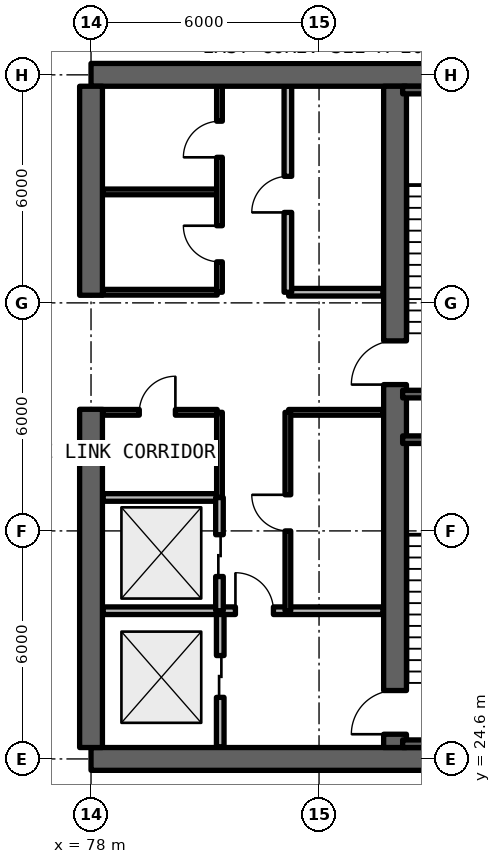
"""IFC4 building model, lengths in metres.
Left out: names, types, materials, properties, quantities, classifications, styles, units other than length and angle.
Written with IfcOpenShell. Run it as: python <this file> out.ifc"""

import sys

from ifc_helpers import new_model, si_unit, direction, frame, frame_2d, origin, place, context, subcontext, project, spatial, rectangle, extrude, element, fill, save


model = new_model("IFC4")
c1 = context("Model", 3, precision=1e-05, world=origin(), true_north=direction((0.0, 1.0)))
c2 = subcontext(c1, "Body", "Model", "MODEL_VIEW")
j1 = project(units=[si_unit("LENGTHUNIT", "METRE"), si_unit("PLANEANGLEUNIT", "RADIAN")], contexts=[c1])
p1 = place(None, origin())
s1 = spatial("IfcSite", under=j1, at=p1, CompositionType="ELEMENT")
p2 = place(p1, origin())
s2 = spatial("IfcBuilding", under=s1, at=p2, CompositionType="ELEMENT")
p3 = place(p2, frame((0.0, 0.0, -9.24)))
s3 = spatial("IfcBuildingStorey", under=s2, at=p3, CompositionType="ELEMENT", Elevation=-9.24)
for number, where, z_axis, x_axis in (
    (1, (78.0, 24.6, 0.0), (0.0, 0.0, 1.0), (1.0, 0.0, 0.0)),
    (2, (90.0, 42.6, 0.0), (0.0, 0.0, 1.0), (-1.0, 0.0, 0.0)),
):
    element("IfcWall", number, at=place(p3, frame(where, z_axis=z_axis, x_axis=x_axis)), inside=s3, PredefinedType="SHEAR", context=c2, shape_type="SweptSolid", body=[
        extrude(rectangle(XDim=12.0, YDim=0.6, at=frame_2d((6.0, 0.0))), origin(), (0.0, 0.0, 1.0), 4.62),
    ])
p4 = place(p3, frame((78.0, 24.9, 0.0), z_axis=(0.0, 0.0, 1.0), x_axis=(0.0, 1.0, 0.0)))
e3 = element("IfcWall", 3, at=p4, inside=s3, PredefinedType="SHEAR", context=c2, shape_type="SweptSolid", body=[
    extrude(rectangle(XDim=8.9, YDim=0.6, at=frame_2d((4.45, 0.0))), origin(), (0.0, 0.0, 1.0), 4.62),
])
p5 = place(p3, frame((78.0, 36.8, 0.0), z_axis=(0.0, 0.0, 1.0), x_axis=(0.0, 1.0, 0.0)))
e4 = element("IfcWall", 4, at=p5, inside=s3, PredefinedType="SHEAR", context=c2, shape_type="SweptSolid", body=[
    extrude(rectangle(XDim=5.5, YDim=0.6, at=frame_2d((2.75, 0.0))), origin(), (0.0, 0.0, 1.0), 4.62),
])
p6 = place(p3, frame((86.0, 24.9, 0.0), z_axis=(0.0, 0.0, 1.0), x_axis=(0.0, 1.0, 0.0)))
e5 = element("IfcWall", 5, at=p6, inside=s3, PredefinedType="SHEAR", context=c2, shape_type="SweptSolid", body=[
    extrude(rectangle(XDim=17.4, YDim=0.6, at=frame_2d((8.7, 0.0))), origin(), (0.0, 0.0, 1.0), 4.62),
])
p7 = place(p6, frame((0.35, 0.0, 0.0)))
e6 = element("IfcOpeningElement", 6, at=p7, cuts=e5, PredefinedType="OPENING", context=c2, shape_type="SweptSolid", body=[
    extrude(rectangle(XDim=1.15, YDim=2.15, at=frame_2d((0.575, 1.075))), frame((0.0, 0.31, 0.0), z_axis=(0.0, -1.0, 0.0), x_axis=(1.0, 0.0, 0.0)), (0.0, 0.0, 1.0), 0.62),
])
p8 = place(p6, frame((9.55, 0.0, 0.0)))
e7 = element("IfcOpeningElement", 7, at=p8, cuts=e5, PredefinedType="OPENING", context=c2, shape_type="SweptSolid", body=[
    extrude(rectangle(XDim=1.15, YDim=2.15, at=frame_2d((0.575, 1.075))), frame((0.0, 0.31, 0.0), z_axis=(0.0, -1.0, 0.0), x_axis=(1.0, 0.0, 0.0)), (0.0, 0.0, 1.0), 0.62),
])
p9 = place(p3, frame((81.4, 24.92, 0.0), z_axis=(0.0, 0.0, 1.0), x_axis=(0.0, 1.0, 0.0)))
e8 = element("IfcWall", 8, at=p9, inside=s3, PredefinedType="SOLIDWALL", context=c2, shape_type="SweptSolid", body=[
    extrude(rectangle(XDim=3.58, YDim=0.2, at=frame_2d((1.79, 0.0))), origin(), (0.0, 0.0, 1.0), 3.54),
])
p10 = place(p9, frame((1.3, 0.0, 0.0)))
e9 = element("IfcOpeningElement", 9, at=p10, cuts=e8, PredefinedType="OPENING", context=c2, shape_type="SweptSolid", body=[
    extrude(rectangle(XDim=1.1, YDim=2.2, at=frame_2d((0.55, 1.1))), frame((0.0, 0.11, 0.0), z_axis=(0.0, -1.0, 0.0), x_axis=(1.0, 0.0, 0.0)), (0.0, 0.0, 1.0), 0.22),
])
p11 = place(p3, frame((78.32, 28.5, 0.0), z_axis=(0.0, 0.0, 1.0), x_axis=(1.0, 0.0, 0.0)))
e10 = element("IfcWall", 10, at=p11, inside=s3, PredefinedType="SOLIDWALL", context=c2, shape_type="SweptSolid", body=[
    extrude(rectangle(XDim=7.36, YDim=0.2, at=frame_2d((3.68, 0.0))), origin(), (0.0, 0.0, 1.0), 3.54),
])
p12 = place(p11, frame((3.48, 0.0, 0.0)))
e11 = element("IfcOpeningElement", 11, at=p12, cuts=e10, PredefinedType="OPENING", context=c2, shape_type="SweptSolid", body=[
    extrude(rectangle(XDim=1.0, YDim=2.15, at=frame_2d((0.5, 1.075))), frame((0.0, 0.11, 0.0), z_axis=(0.0, -1.0, 0.0), x_axis=(1.0, 0.0, 0.0)), (0.0, 0.0, 1.0), 0.22),
])
p13 = place(p3, frame((83.2, 33.72, 0.0), z_axis=(0.0, 0.0, 1.0), x_axis=(1.0, 0.0, 0.0)))
e12 = element("IfcWall", 12, at=p13, inside=s3, PredefinedType="SOLIDWALL", context=c2, shape_type="SweptSolid", body=[
    extrude(rectangle(XDim=2.48, YDim=0.15, at=frame_2d((1.24, 0.0))), origin(), (0.0, 0.0, 1.0), 3.54),
])
p14 = place(p3, frame((83.18, 28.5, 0.0), z_axis=(0.0, 0.0, 1.0), x_axis=(0.0, 1.0, 0.0)))
e13 = element("IfcWall", 13, at=p14, inside=s3, PredefinedType="SOLIDWALL", context=c2, shape_type="SweptSolid", body=[
    extrude(rectangle(XDim=5.22, YDim=0.15, at=frame_2d((2.61, 0.0))), origin(), (0.0, 0.0, 1.0), 3.54),
])
p15 = place(p14, frame((2.1, 0.0, 0.0)))
e14 = element("IfcOpeningElement", 14, at=p15, cuts=e13, PredefinedType="OPENING", context=c2, shape_type="SweptSolid", body=[
    extrude(rectangle(XDim=0.95, YDim=2.15, at=frame_2d((0.475, 1.075))), frame((0.0, 0.085, 0.0), z_axis=(0.0, -1.0, 0.0), x_axis=(1.0, 0.0, 0.0)), (0.0, 0.0, 1.0), 0.17),
])
p16 = place(p3, frame((78.32, 31.48, 0.0), z_axis=(0.0, 0.0, 1.0), x_axis=(1.0, 0.0, 0.0)))
e15 = element("IfcWall", 15, at=p16, inside=s3, PredefinedType="SOLIDWALL", context=c2, shape_type="SweptSolid", body=[
    extrude(rectangle(XDim=3.0, YDim=0.2, at=frame_2d((1.5, 0.0))), origin(), (0.0, 0.0, 1.0), 3.54),
])
p17 = place(p3, frame((81.38, 28.5, 0.0), z_axis=(0.0, 0.0, 1.0), x_axis=(0.0, 1.0, 0.0)))
e16 = element("IfcWall", 16, at=p17, inside=s3, PredefinedType="SOLIDWALL", context=c2, shape_type="SweptSolid", body=[
    extrude(rectangle(XDim=2.98, YDim=0.2, at=frame_2d((1.49, 0.0))), origin(), (0.0, 0.0, 1.0), 3.54),
])
p18 = place(p17, frame((0.9, 0.0, 0.0)))
e17 = element("IfcOpeningElement", 17, at=p18, cuts=e16, PredefinedType="OPENING", context=c2, shape_type="SweptSolid", body=[
    extrude(rectangle(XDim=1.1, YDim=2.2, at=frame_2d((0.55, 1.1))), frame((0.0, 0.11, 0.0), z_axis=(0.0, -1.0, 0.0), x_axis=(1.0, 0.0, 0.0)), (0.0, 0.0, 1.0), 0.22),
])
p19 = place(p3, frame((81.38, 31.48, 0.0), z_axis=(0.0, 0.0, 1.0), x_axis=(0.0, 1.0, 0.0)))
e18 = element("IfcWall", 18, at=p19, inside=s3, PredefinedType="SOLIDWALL", context=c2, shape_type="SweptSolid", body=[
    extrude(rectangle(XDim=2.24, YDim=0.15, at=frame_2d((1.12, 0.0))), origin(), (0.0, 0.0, 1.0), 3.54),
])
p20 = place(p3, frame((78.32, 33.72, 0.0), z_axis=(0.0, 0.0, 1.0), x_axis=(1.0, 0.0, 0.0)))
e19 = element("IfcWall", 19, at=p20, inside=s3, PredefinedType="SOLIDWALL", context=c2, shape_type="SweptSolid", body=[
    extrude(rectangle(XDim=3.0, YDim=0.15, at=frame_2d((1.5, 0.0))), origin(), (0.0, 0.0, 1.0), 3.54),
])
p21 = place(p20, frame((0.95, 0.0, 0.0)))
e20 = element("IfcOpeningElement", 20, at=p21, cuts=e19, PredefinedType="OPENING", context=c2, shape_type="SweptSolid", body=[
    extrude(rectangle(XDim=0.95, YDim=2.15, at=frame_2d((0.475, 1.075))), frame((0.0, 0.085, 0.0), z_axis=(0.0, -1.0, 0.0), x_axis=(1.0, 0.0, 0.0)), (0.0, 0.0, 1.0), 0.17),
])
p22 = place(p3, frame((83.2, 36.88, 0.0), z_axis=(0.0, 0.0, 1.0), x_axis=(1.0, 0.0, 0.0)))
e21 = element("IfcWall", 21, at=p22, inside=s3, PredefinedType="SOLIDWALL", context=c2, shape_type="SweptSolid", body=[
    extrude(rectangle(XDim=2.48, YDim=0.2, at=frame_2d((1.24, 0.0))), origin(), (0.0, 0.0, 1.0), 3.54),
])
p23 = place(p3, frame((83.18, 36.88, 0.0), z_axis=(0.0, 0.0, 1.0), x_axis=(0.0, 1.0, 0.0)))
e22 = element("IfcWall", 22, at=p23, inside=s3, PredefinedType="SOLIDWALL", context=c2, shape_type="SweptSolid", body=[
    extrude(rectangle(XDim=5.42, YDim=0.2, at=frame_2d((2.71, 0.0))), origin(), (0.0, 0.0, 1.0), 3.54),
])
p24 = place(p23, frame((2.1, 0.0, 0.0)))
e23 = element("IfcOpeningElement", 23, at=p24, cuts=e22, PredefinedType="OPENING", context=c2, shape_type="SweptSolid", body=[
    extrude(rectangle(XDim=0.95, YDim=2.15, at=frame_2d((0.475, 1.075))), frame((0.0, 0.11, 0.0), z_axis=(0.0, -1.0, 0.0), x_axis=(1.0, 0.0, 0.0)), (0.0, 0.0, 1.0), 0.22),
])
for number, where, z_axis, x_axis in (
    (24, (78.32, 36.88, 0.0), (0.0, 0.0, 1.0), (1.0, 0.0, 0.0)),
    (25, (78.32, 39.52, 0.0), (0.0, 0.0, 1.0), (1.0, 0.0, 0.0)),
):
    element("IfcWall", number, at=place(p3, frame(where, z_axis=z_axis, x_axis=x_axis)), inside=s3, PredefinedType="SOLIDWALL", context=c2, shape_type="SweptSolid", body=[
        extrude(rectangle(XDim=3.0, YDim=0.15, at=frame_2d((1.5, 0.0))), origin(), (0.0, 0.0, 1.0), 3.54),
    ])
p25 = place(p3, frame((81.38, 36.88, 0.0), z_axis=(0.0, 0.0, 1.0), x_axis=(0.0, 1.0, 0.0)))
e26 = element("IfcWall", 26, at=p25, inside=s3, PredefinedType="SOLIDWALL", context=c2, shape_type="SweptSolid", body=[
    extrude(rectangle(XDim=5.42, YDim=0.15, at=frame_2d((2.71, 0.0))), origin(), (0.0, 0.0, 1.0), 3.54),
])
p26 = place(p25, frame((0.8, 0.0, 0.0)))
e27 = element("IfcOpeningElement", 27, at=p26, cuts=e26, PredefinedType="OPENING", context=c2, shape_type="SweptSolid", body=[
    extrude(rectangle(XDim=0.95, YDim=2.15, at=frame_2d((0.475, 1.075))), frame((0.0, 0.085, 0.0), z_axis=(0.0, -1.0, 0.0), x_axis=(1.0, 0.0, 0.0)), (0.0, 0.0, 1.0), 0.17),
])
p27 = place(p25, frame((3.55, 0.0, 0.0)))
e28 = element("IfcOpeningElement", 28, at=p27, cuts=e26, PredefinedType="OPENING", context=c2, shape_type="SweptSolid", body=[
    extrude(rectangle(XDim=0.95, YDim=2.15, at=frame_2d((0.475, 1.075))), frame((0.0, 0.085, 0.0), z_axis=(0.0, -1.0, 0.0), x_axis=(1.0, 0.0, 0.0)), (0.0, 0.0, 1.0), 0.17),
])
for number, where, z_axis, x_axis in (
    (29, (86.2, 25.0, 0.0), (0.0, 0.0, 1.0), (1.0, 0.0, 0.0)),
    (30, (89.6, 33.0, 0.0), (0.0, 0.0, 1.0), (-1.0, 0.0, 0.0)),
    (31, (86.2, 34.2, 0.0), (0.0, 0.0, 1.0), (1.0, 0.0, 0.0)),
    (32, (89.6, 42.2, 0.0), (0.0, 0.0, 1.0), (-1.0, 0.0, 0.0)),
):
    element("IfcWall", number, at=place(p3, frame(where, z_axis=z_axis, x_axis=x_axis)), inside=s3, PredefinedType="SOLIDWALL", context=c2, shape_type="SweptSolid", body=[
        extrude(rectangle(XDim=3.4, YDim=0.2, at=frame_2d((1.7, 0.0))), origin(), (0.0, 0.0, 1.0), 4.62),
    ])
p28 = place(p10, origin())
e33 = element("IfcDoor", 33, at=p28, inside=s3, OperationType="SLIDING_TO_LEFT", PredefinedType="DOOR", context=c2, shape_type="SweptSolid", body=[
    extrude(rectangle(XDim=1.1, YDim=2.2, at=frame_2d((0.55, 1.1))), frame((0.0, 0.025, 0.0), z_axis=(0.0, -1.0, 0.0), x_axis=(1.0, 0.0, 0.0)), (0.0, 0.0, 1.0), 0.05),
])
fill(e9, e33)
p29 = place(p12, origin())
e34 = element("IfcDoor", 34, at=p29, inside=s3, OperationType="SINGLE_SWING_LEFT", PredefinedType="DOOR", context=c2, shape_type="SweptSolid", body=[
    extrude(rectangle(XDim=1.0, YDim=2.15, at=frame_2d((0.5, 1.075))), frame((0.0, 0.025, 0.0), z_axis=(0.0, -1.0, 0.0), x_axis=(1.0, 0.0, 0.0)), (0.0, 0.0, 1.0), 0.05),
])
fill(e11, e34)
p30 = place(p15, origin())
e35 = element("IfcDoor", 35, at=p30, inside=s3, OperationType="SINGLE_SWING_RIGHT", PredefinedType="DOOR", context=c2, shape_type="SweptSolid", body=[
    extrude(rectangle(XDim=0.95, YDim=2.15, at=frame_2d((0.475, 1.075))), frame((0.0, 0.025, 0.0), z_axis=(0.0, -1.0, 0.0), x_axis=(1.0, 0.0, 0.0)), (0.0, 0.0, 1.0), 0.05),
])
fill(e14, e35)
p31 = place(p18, origin())
e36 = element("IfcDoor", 36, at=p31, inside=s3, OperationType="SLIDING_TO_LEFT", PredefinedType="DOOR", context=c2, shape_type="SweptSolid", body=[
    extrude(rectangle(XDim=1.1, YDim=2.2, at=frame_2d((0.55, 1.1))), frame((0.0, 0.025, 0.0), z_axis=(0.0, -1.0, 0.0), x_axis=(1.0, 0.0, 0.0)), (0.0, 0.0, 1.0), 0.05),
])
fill(e17, e36)
p32 = place(p21, origin())
e37 = element("IfcDoor", 37, at=p32, inside=s3, OperationType="SINGLE_SWING_RIGHT", PredefinedType="DOOR", context=c2, shape_type="SweptSolid", body=[
    extrude(rectangle(XDim=0.95, YDim=2.15, at=frame_2d((0.475, 1.075))), frame((0.0, 0.025, 0.0), z_axis=(0.0, -1.0, 0.0), x_axis=(1.0, 0.0, 0.0)), (0.0, 0.0, 1.0), 0.05),
])
fill(e20, e37)
p33 = place(p24, origin())
e38 = element("IfcDoor", 38, at=p33, inside=s3, OperationType="SINGLE_SWING_LEFT", PredefinedType="DOOR", context=c2, shape_type="SweptSolid", body=[
    extrude(rectangle(XDim=0.95, YDim=2.15, at=frame_2d((0.475, 1.075))), frame((0.0, 0.025, 0.0), z_axis=(0.0, -1.0, 0.0), x_axis=(1.0, 0.0, 0.0)), (0.0, 0.0, 1.0), 0.05),
])
fill(e23, e38)
p34 = place(p26, origin())
e39 = element("IfcDoor", 39, at=p34, inside=s3, OperationType="SINGLE_SWING_RIGHT", PredefinedType="DOOR", context=c2, shape_type="SweptSolid", body=[
    extrude(rectangle(XDim=0.95, YDim=2.15, at=frame_2d((0.475, 1.075))), frame((0.0, 0.025, 0.0), z_axis=(0.0, -1.0, 0.0), x_axis=(1.0, 0.0, 0.0)), (0.0, 0.0, 1.0), 0.05),
])
fill(e27, e39)
p35 = place(p27, origin())
e40 = element("IfcDoor", 40, at=p35, inside=s3, OperationType="SINGLE_SWING_LEFT", PredefinedType="DOOR", context=c2, shape_type="SweptSolid", body=[
    extrude(rectangle(XDim=0.95, YDim=2.15, at=frame_2d((0.475, 1.075))), frame((0.0, 0.025, 0.0), z_axis=(0.0, -1.0, 0.0), x_axis=(1.0, 0.0, 0.0)), (0.0, 0.0, 1.0), 0.05),
])
fill(e28, e40)
p36 = place(p7, origin())
e41 = element("IfcDoor", 41, at=p36, inside=s3, OperationType="SINGLE_SWING_LEFT", PredefinedType="DOOR", context=c2, shape_type="SweptSolid", body=[
    extrude(rectangle(XDim=1.15, YDim=2.15, at=frame_2d((0.575, 1.075))), frame((0.0, 0.025, 0.0), z_axis=(0.0, -1.0, 0.0), x_axis=(1.0, 0.0, 0.0)), (0.0, 0.0, 1.0), 0.05),
])
fill(e6, e41)
p37 = place(p8, origin())
e42 = element("IfcDoor", 42, at=p37, inside=s3, OperationType="SINGLE_SWING_RIGHT", PredefinedType="DOOR", context=c2, shape_type="SweptSolid", body=[
    extrude(rectangle(XDim=1.15, YDim=2.15, at=frame_2d((0.575, 1.075))), frame((0.0, 0.025, 0.0), z_axis=(0.0, -1.0, 0.0), x_axis=(1.0, 0.0, 0.0)), (0.0, 0.0, 1.0), 0.05),
])
fill(e7, e42)
save(model, sys.argv[1])
